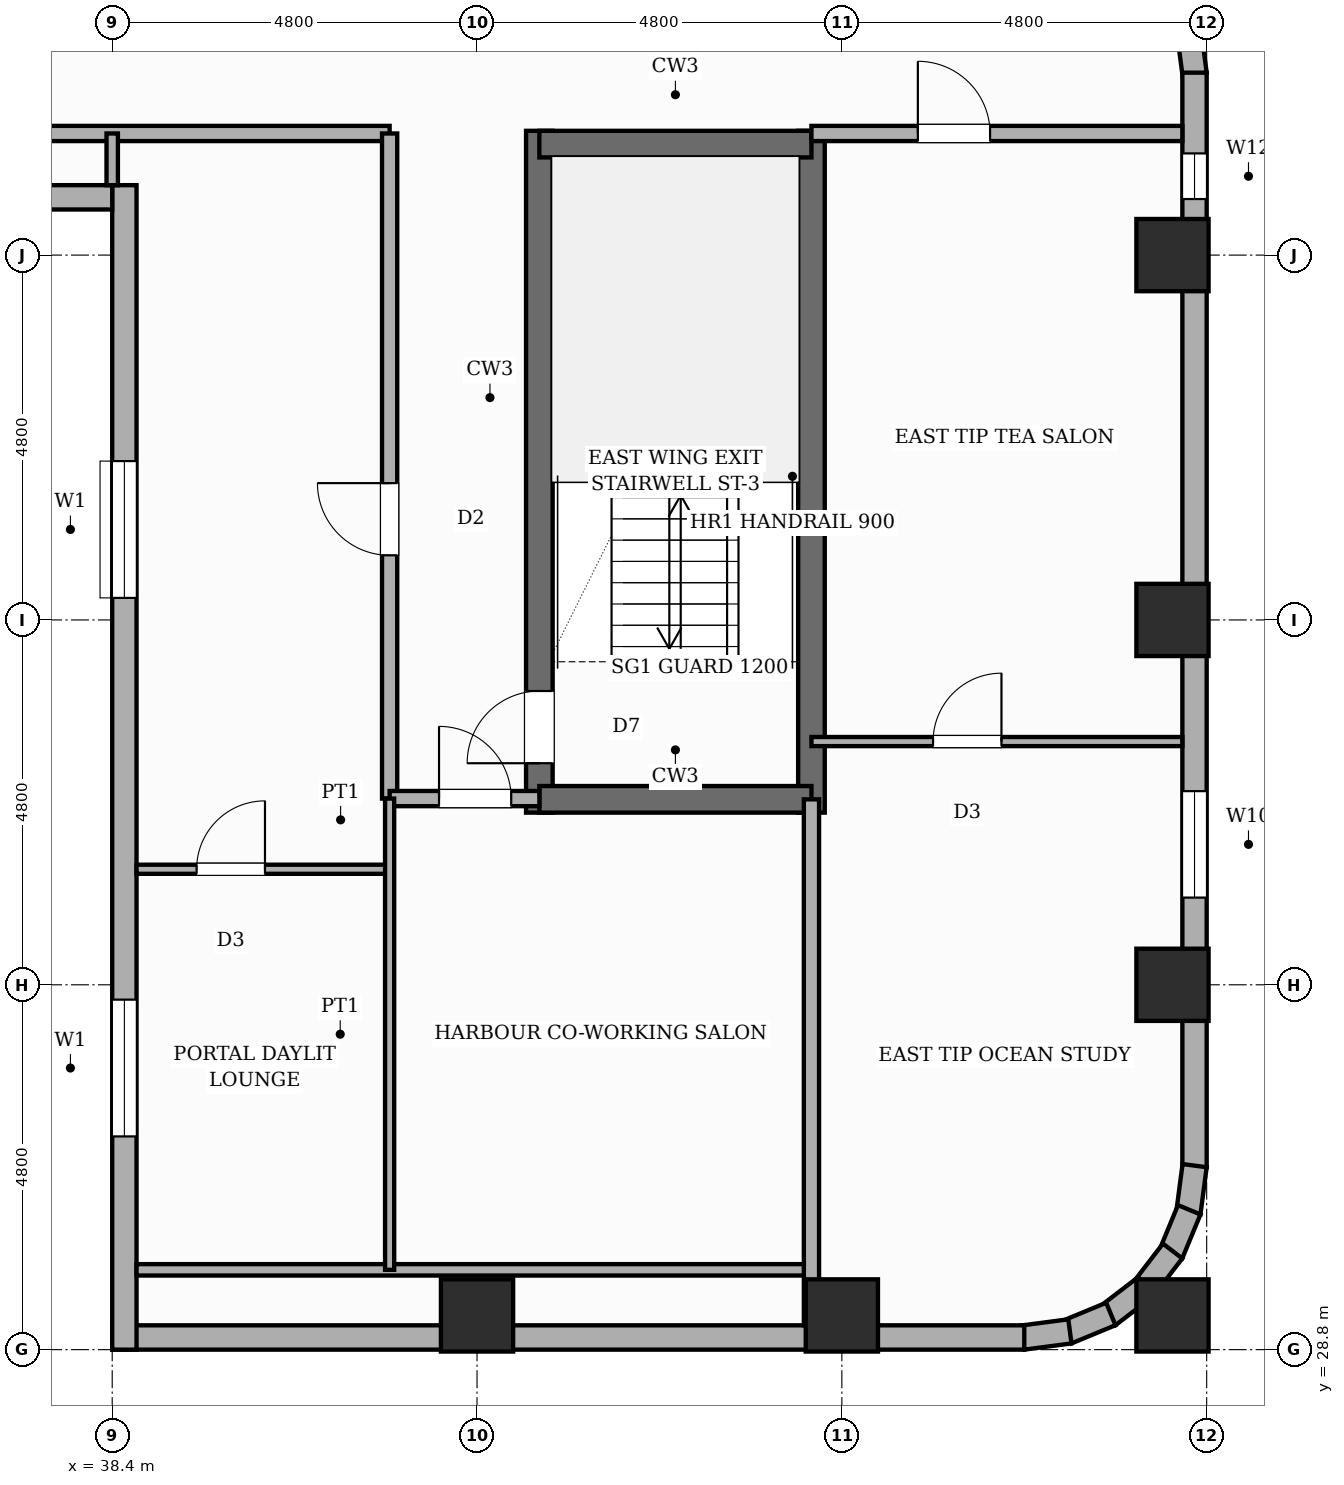
"""IFC4 building model, lengths in metres.
Left out: names, types, materials, properties, quantities, classifications, styles, units other than length and angle.
Written with IfcOpenShell. Run it as: python <this file> out.ifc"""

import sys

from ifc_helpers import new_model, si_unit, direction, frame, frame_2d, origin, origin_2d, place, context, subcontext, project, spatial, rectangle, extrude, element, fill, save


model = new_model("IFC4")
c1 = context("Model", 3, precision=1e-05, world=origin(), true_north=direction((0.0, 1.0)))
c2 = subcontext(c1, "Body", "Model", "MODEL_VIEW")
j1 = project(units=[si_unit("LENGTHUNIT", "METRE"), si_unit("PLANEANGLEUNIT", "RADIAN")], contexts=[c1])
p1 = place(None, origin())
s1 = spatial("IfcSite", under=j1, at=p1, CompositionType="ELEMENT")
p2 = place(p1, origin())
s2 = spatial("IfcBuilding", under=s1, at=p2, CompositionType="ELEMENT")
p3 = place(p2, frame((0.0, 0.0, 107.2)))
s3 = spatial("IfcBuildingStorey", under=s2, at=p3, CompositionType="ELEMENT", Elevation=107.2)
p4 = place(p3, frame((44.02, 35.865, 0.0), z_axis=(0.0, 0.0, 1.0), x_axis=(0.0, 1.0, 0.0)))
e1 = element("IfcWall", 1, at=p4, inside=s3, PredefinedType="SHEAR", context=c2, shape_type="SweptSolid", body=[
    extrude(rectangle(XDim=8.97, YDim=0.35, at=frame_2d((4.485, 0.0))), origin(), (0.0, 0.0, 1.0), 3.6),
])
p5 = place(p4, frame((0.65, 0.0, 0.0)))
e2 = element("IfcOpeningElement", 2, at=p5, cuts=e1, PredefinedType="OPENING", context=c2, shape_type="SweptSolid", body=[
    extrude(rectangle(XDim=0.95, YDim=2.1, at=frame_2d((0.475, 1.05))), frame((0.0, 0.185, 0.0), z_axis=(0.0, -1.0, 0.0), x_axis=(1.0, 0.0, 0.0)), (0.0, 0.0, 1.0), 0.37),
])
p6 = place(p3, frame((47.6, 35.865, 0.0), z_axis=(0.0, 0.0, 1.0), x_axis=(0.0, 1.0, 0.0)))
e3 = element("IfcWall", 3, at=p6, inside=s3, PredefinedType="SHEAR", context=c2, shape_type="SweptSolid", body=[
    extrude(rectangle(XDim=8.97, YDim=0.35, at=frame_2d((4.485, 0.0))), origin(), (0.0, 0.0, 1.0), 3.6),
])
for number, where, z_axis, x_axis in (
    (4, (44.02, 36.04, 0.0), (0.0, 0.0, 1.0), (1.0, 0.0, 0.0)),
    (5, (44.02, 44.66, 0.0), (0.0, 0.0, 1.0), (1.0, 0.0, 0.0)),
):
    element("IfcWall", number, at=place(p3, frame(where, z_axis=z_axis, x_axis=x_axis)), inside=s3, PredefinedType="SHEAR", context=c2, shape_type="SweptSolid", body=[
        extrude(rectangle(XDim=3.58, YDim=0.35, at=frame_2d((1.79, 0.0))), origin(), (0.0, 0.0, 1.0), 3.6),
    ])
for number, where, z_axis, x_axis in (
    (6, (43.2, 29.25, 0.0), (0.0, 0.0, 1.0), (1.0, 0.0, 0.0)),
    (7, (48.0, 29.25, 0.0), (0.0, 0.0, 1.0), (1.0, 0.0, 0.0)),
    (8, (52.35, 29.25, 0.0), (0.0, 0.0, 1.0), (1.0, 0.0, 0.0)),
    (9, (52.35, 33.6, 0.0), (0.0, 0.0, 1.0), (1.0, 0.0, 0.0)),
    (10, (52.35, 38.4, 0.0), (0.0, 0.0, 1.0), (1.0, 0.0, 0.0)),
    (11, (52.35, 43.2, 0.0), (0.0, 0.0, 1.0), (1.0, 0.0, 0.0)),
):
    element("IfcColumn", number, at=place(p3, frame(where, z_axis=z_axis, x_axis=x_axis)), inside=s3, PredefinedType="COLUMN", context=c2, shape_type="SweptSolid", body=[
        extrude(rectangle(XDim=0.95, YDim=0.95, at=origin_2d()), origin(), (0.0, 0.0, 1.0), 3.6),
    ])
p7 = place(p3, frame((52.56, 46.2, 0.0), z_axis=(0.0, 0.0, 1.0), x_axis=(0.130555323746, -0.9914410257, 0.0)))
e12 = element("IfcWall", 12, at=p7, inside=s3, PredefinedType="STANDARD", context=c2, shape_type="SweptSolid", body=[
    extrude(rectangle(XDim=0.626, YDim=0.32, at=frame_2d((0.313, 0.0))), origin(), (0.0, 0.0, 1.0), 2.54),
])
p8 = place(p3, frame((52.64, 45.6, 0.0), z_axis=(0.0, 0.0, 1.0), x_axis=(0.0, -1.0, 0.0)))
e13 = element("IfcWall", 13, at=p8, inside=s3, PredefinedType="STANDARD", context=c2, shape_type="SweptSolid", body=[
    extrude(rectangle(XDim=14.4, YDim=0.32, at=frame_2d((7.2, 0.0))), origin(), (0.0, 0.0, 1.0), 2.54),
])
p9 = place(p8, frame((1.062, 0.0, 0.45)))
e14 = element("IfcOpeningElement", 14, at=p9, cuts=e13, PredefinedType="OPENING", context=c2, shape_type="SweptSolid", body=[
    extrude(rectangle(XDim=0.6, YDim=1.8, at=frame_2d((0.3, 0.9))), frame((0.0, 0.17, 0.0), z_axis=(0.0, -1.0, 0.0), x_axis=(1.0, 0.0, 0.0)), (0.0, 0.0, 1.0), 0.34),
])
p10 = place(p8, frame((9.452, 0.0, 0.65)))
e15 = element("IfcOpeningElement", 15, at=p10, cuts=e13, PredefinedType="OPENING", context=c2, shape_type="SweptSolid", body=[
    extrude(rectangle(XDim=1.4, YDim=1.1, at=frame_2d((0.7, 0.55))), frame((0.0, 0.17, 0.0), z_axis=(0.0, -1.0, 0.0), x_axis=(1.0, 0.0, 0.0)), (0.0, 0.0, 1.0), 0.34),
])
p11 = place(p3, frame((52.641, 31.221, 0.0), z_axis=(0.0, 0.0, 1.0), x_axis=(-0.130504898859, -0.991447664465, 0.0)))
e16 = element("IfcWall", 16, at=p11, inside=s3, PredefinedType="STANDARD", context=c2, shape_type="SweptSolid", body=[
    extrude(rectangle(XDim=0.627, YDim=0.32, at=frame_2d((0.313, 0.0))), origin(), (0.0, 0.0, 1.0), 2.54),
])
p12 = place(p3, frame((52.57, 30.64, 0.0), z_axis=(0.0, 0.0, 1.0), x_axis=(-0.382455093999, -0.923974080304, 0.0)))
e17 = element("IfcWall", 17, at=p12, inside=s3, PredefinedType="STANDARD", context=c2, shape_type="SweptSolid", body=[
    extrude(rectangle(XDim=0.626, YDim=0.32, at=frame_2d((0.313, 0.0))), origin(), (0.0, 0.0, 1.0), 2.54),
])
p13 = place(p3, frame((52.352, 30.097, 0.0), z_axis=(0.0, 0.0, 1.0), x_axis=(-0.608693302629, -0.793405610854, 0.0)))
e18 = element("IfcWall", 18, at=p13, inside=s3, PredefinedType="STANDARD", context=c2, shape_type="SweptSolid", body=[
    extrude(rectangle(XDim=0.626, YDim=0.32, at=frame_2d((0.313, 0.0))), origin(), (0.0, 0.0, 1.0), 2.54),
])
p14 = place(p3, frame((52.0, 29.63, 0.0), z_axis=(0.0, 0.0, 1.0), x_axis=(-0.7932174212, -0.608938521285, 0.0)))
e19 = element("IfcWall", 19, at=p14, inside=s3, PredefinedType="STANDARD", context=c2, shape_type="SweptSolid", body=[
    extrude(rectangle(XDim=0.627, YDim=0.32, at=frame_2d((0.313, 0.0))), origin(), (0.0, 0.0, 1.0), 2.54),
])
for number, where, z_axis, x_axis in (
    (20, (51.539, 29.269, 0.0), (0.0, 0.0, 1.0), (-0.924, -0.383, 0.0)),
    (21, (51.0, 29.04, 0.0), (0.0, 0.0, 1.0), (-0.991, -0.131, 0.0)),
):
    element("IfcWall", number, at=place(p3, frame(where, z_axis=z_axis, x_axis=x_axis)), inside=s3, PredefinedType="STANDARD", context=c2, shape_type="SweptSolid", body=[
        extrude(rectangle(XDim=0.626, YDim=0.32, at=frame_2d((0.313, 0.0))), origin(), (0.0, 0.0, 1.0), 2.54),
    ])
p15 = place(p3, frame((50.4, 28.96, 0.0), z_axis=(0.0, 0.0, 1.0), x_axis=(-1.0, 0.0, 0.0)))
e22 = element("IfcWall", 22, at=p15, inside=s3, PredefinedType="STANDARD", context=c2, shape_type="SweptSolid", body=[
    extrude(rectangle(XDim=12.0, YDim=0.32, at=frame_2d((6.0, 0.0))), origin(), (0.0, 0.0, 1.0), 1.78),
])
p16 = place(p3, frame((38.56, 28.8, 0.0), z_axis=(0.0, 0.0, 1.0), x_axis=(0.0, 1.0, 0.0)))
e23 = element("IfcWall", 23, at=p16, inside=s3, PredefinedType="STANDARD", context=c2, shape_type="SweptSolid", body=[
    extrude(rectangle(XDim=15.32, YDim=0.32, at=frame_2d((7.66, 0.0))), origin(), (0.0, 0.0, 1.0), 3.36),
])
p17 = place(p16, frame((9.89, 0.0, 0.8)))
e24 = element("IfcOpeningElement", 24, at=p17, cuts=e23, PredefinedType="OPENING", context=c2, shape_type="SweptSolid", body=[
    extrude(rectangle(XDim=1.8, YDim=2.1, at=frame_2d((0.9, 1.05))), frame((0.0, 0.17, 0.0), z_axis=(0.0, -1.0, 0.0), x_axis=(1.0, 0.0, 0.0)), (0.0, 0.0, 1.0), 0.34),
])
p18 = place(p16, frame((2.805, 0.0, 0.8)))
e25 = element("IfcOpeningElement", 25, at=p18, cuts=e23, PredefinedType="OPENING", context=c2, shape_type="SweptSolid", body=[
    extrude(rectangle(XDim=1.8, YDim=2.1, at=frame_2d((0.9, 1.05))), frame((0.0, 0.17, 0.0), z_axis=(0.0, -1.0, 0.0), x_axis=(1.0, 0.0, 0.0)), (0.0, 0.0, 1.0), 0.34),
])
p19 = place(p3, frame((38.4, 43.96, 0.0), z_axis=(0.0, 0.0, 1.0), x_axis=(-1.0, 0.0, 0.0)))
e26 = element("IfcWall", 26, at=p19, inside=s3, PredefinedType="STANDARD", context=c2, shape_type="SweptSolid", body=[
    extrude(rectangle(XDim=12.32, YDim=0.32, at=frame_2d((6.16, 0.0))), origin(), (0.0, 0.0, 1.0), 3.36),
])
p20 = place(p19, frame((5.26, 0.0, 0.8)))
e27 = element("IfcOpeningElement", 27, at=p20, cuts=e26, PredefinedType="OPENING", context=c2, shape_type="SweptSolid", body=[
    extrude(rectangle(XDim=1.8, YDim=2.1, at=frame_2d((0.9, 1.05))), frame((0.0, 0.17, 0.0), z_axis=(0.0, -1.0, 0.0), x_axis=(1.0, 0.0, 0.0)), (0.0, 0.0, 1.0), 0.34),
])
p21 = place(p3, frame((24.75, 44.8, 0.0), z_axis=(0.0, 0.0, 1.0), x_axis=(1.0, 0.0, 0.0)))
e28 = element("IfcWall", 28, at=p21, inside=s3, PredefinedType="PARTITIONING", context=c2, shape_type="SweptSolid", body=[
    extrude(rectangle(XDim=17.3, YDim=0.2, at=frame_2d((8.65, 0.0))), origin(), (0.0, 0.0, 1.0), 3.36),
])
p22 = place(p21, frame((6.2, 0.0, 0.0)))
e29 = element("IfcOpeningElement", 29, at=p22, cuts=e28, PredefinedType="OPENING", context=c2, shape_type="SweptSolid", body=[
    extrude(rectangle(XDim=0.95, YDim=2.15, at=frame_2d((0.475, 1.075))), frame((0.0, 0.11, 0.0), z_axis=(0.0, -1.0, 0.0), x_axis=(1.0, 0.0, 0.0)), (0.0, 0.0, 1.0), 0.22),
])
p23 = place(p3, frame((38.4, 44.12, 0.0), z_axis=(0.0, 0.0, 1.0), x_axis=(0.0, 1.0, 0.0)))
e30 = element("IfcWall", 30, at=p23, inside=s3, PredefinedType="PARTITIONING", context=c2, shape_type="SweptSolid", body=[
    extrude(rectangle(XDim=0.68, YDim=0.15, at=frame_2d((0.34, 0.0))), origin(), (0.0, 0.0, 1.0), 3.36),
])
p24 = place(p3, frame((47.6, 44.8, 0.0), z_axis=(0.0, 0.0, 1.0), x_axis=(1.0, 0.0, 0.0)))
e31 = element("IfcWall", 31, at=p24, inside=s3, PredefinedType="PARTITIONING", context=c2, shape_type="SweptSolid", body=[
    extrude(rectangle(XDim=4.88, YDim=0.2, at=frame_2d((2.44, 0.0))), origin(), (0.0, 0.0, 1.0), 3.36),
])
p25 = place(p24, frame((1.4, 0.0, 0.0)))
e32 = element("IfcOpeningElement", 32, at=p25, cuts=e31, PredefinedType="OPENING", context=c2, shape_type="SweptSolid", body=[
    extrude(rectangle(XDim=0.95, YDim=2.15, at=frame_2d((0.475, 1.075))), frame((0.0, 0.11, 0.0), z_axis=(0.0, -1.0, 0.0), x_axis=(1.0, 0.0, 0.0)), (0.0, 0.0, 1.0), 0.22),
])
p26 = place(p3, frame((42.05, 36.05, 0.0), z_axis=(0.0, 0.0, 1.0), x_axis=(0.0, 1.0, 0.0)))
e33 = element("IfcWall", 33, at=p26, inside=s3, PredefinedType="PARTITIONING", context=c2, shape_type="SweptSolid", body=[
    extrude(rectangle(XDim=8.75, YDim=0.2, at=frame_2d((4.375, 0.0))), origin(), (0.0, 0.0, 1.0), 3.36),
])
p27 = place(p26, frame((3.2, 0.0, 0.0)))
e34 = element("IfcOpeningElement", 34, at=p27, cuts=e33, PredefinedType="OPENING", context=c2, shape_type="SweptSolid", body=[
    extrude(rectangle(XDim=0.95, YDim=2.15, at=frame_2d((0.475, 1.075))), frame((0.0, 0.11, 0.0), z_axis=(0.0, -1.0, 0.0), x_axis=(1.0, 0.0, 0.0)), (0.0, 0.0, 1.0), 0.22),
])
p28 = place(p3, frame((42.05, 36.05, 0.0), z_axis=(0.0, 0.0, 1.0), x_axis=(1.0, 0.0, 0.0)))
e35 = element("IfcWall", 35, at=p28, inside=s3, PredefinedType="PARTITIONING", context=c2, shape_type="SweptSolid", body=[
    extrude(rectangle(XDim=1.97, YDim=0.2, at=frame_2d((0.985, 0.0))), origin(), (0.0, 0.0, 1.0), 3.36),
])
p29 = place(p28, frame((0.65, 0.0, 0.0)))
e36 = element("IfcOpeningElement", 36, at=p29, cuts=e35, PredefinedType="OPENING", context=c2, shape_type="SweptSolid", body=[
    extrude(rectangle(XDim=0.95, YDim=2.15, at=frame_2d((0.475, 1.075))), frame((0.0, 0.11, 0.0), z_axis=(0.0, -1.0, 0.0), x_axis=(1.0, 0.0, 0.0)), (0.0, 0.0, 1.0), 0.22),
])
p30 = place(p3, frame((38.72, 29.85, 0.0), z_axis=(0.0, 0.0, 1.0), x_axis=(1.0, 0.0, 0.0)))
e37 = element("IfcWall", 37, at=p30, inside=s3, PredefinedType="PARTITIONING", context=c2, shape_type="SweptSolid", body=[
    extrude(rectangle(XDim=8.88, YDim=0.15, at=frame_2d((4.44, 0.0))), origin(), (0.0, 0.0, 1.0), 1.78),
])
p31 = place(p3, frame((38.72, 35.12, 0.0), z_axis=(0.0, 0.0, 1.0), x_axis=(1.0, 0.0, 0.0)))
e38 = element("IfcWall", 38, at=p31, inside=s3, PredefinedType="PARTITIONING", context=c2, shape_type="SweptSolid", body=[
    extrude(rectangle(XDim=3.33, YDim=0.12, at=frame_2d((1.665, 0.0))), origin(), (0.0, 0.0, 1.0), 3.36),
])
p32 = place(p31, frame((0.79, 0.0, 0.0)))
e39 = element("IfcOpeningElement", 39, at=p32, cuts=e38, PredefinedType="OPENING", context=c2, shape_type="SweptSolid", body=[
    extrude(rectangle(XDim=0.9, YDim=2.15, at=frame_2d((0.45, 1.075))), frame((0.0, 0.07, 0.0), z_axis=(0.0, -1.0, 0.0), x_axis=(1.0, 0.0, 0.0)), (0.0, 0.0, 1.0), 0.14),
])
p33 = place(p3, frame((42.05, 29.85, 0.0), z_axis=(0.0, 0.0, 1.0), x_axis=(0.0, 1.0, 0.0)))
e40 = element("IfcWall", 40, at=p33, inside=s3, PredefinedType="PARTITIONING", context=c2, shape_type="SweptSolid", body=[
    extrude(rectangle(XDim=6.2, YDim=0.12, at=frame_2d((3.1, 0.0))), origin(), (0.0, 0.0, 1.0), 3.36),
])
p34 = place(p3, frame((47.6, 29.12, 0.0), z_axis=(0.0, 0.0, 1.0), x_axis=(0.0, 1.0, 0.0)))
e41 = element("IfcWall", 41, at=p34, inside=s3, PredefinedType="SOLIDWALL", context=c2, shape_type="SweptSolid", body=[
    extrude(rectangle(XDim=6.92, YDim=0.2, at=frame_2d((3.46, 0.0))), origin(), (0.0, 0.0, 1.0), 3.36),
])
p35 = place(p3, frame((47.6, 36.8, 0.0), z_axis=(0.0, 0.0, 1.0), x_axis=(1.0, 0.0, 0.0)))
e42 = element("IfcWall", 42, at=p35, inside=s3, PredefinedType="PARTITIONING", context=c2, shape_type="SweptSolid", body=[
    extrude(rectangle(XDim=4.88, YDim=0.12, at=frame_2d((2.44, 0.0))), origin(), (0.0, 0.0, 1.0), 3.36),
])
p36 = place(p35, frame((1.6, 0.0, 0.0)))
e43 = element("IfcOpeningElement", 43, at=p36, cuts=e42, PredefinedType="OPENING", context=c2, shape_type="SweptSolid", body=[
    extrude(rectangle(XDim=0.9, YDim=2.15, at=frame_2d((0.45, 1.075))), frame((0.0, 0.07, 0.0), z_axis=(0.0, -1.0, 0.0), x_axis=(1.0, 0.0, 0.0)), (0.0, 0.0, 1.0), 0.14),
])
p37 = place(p9, origin())
e44 = element("IfcWindow", 44, at=p37, inside=s3, PartitioningType="SINGLE_PANEL", PredefinedType="WINDOW", context=c2, shape_type="SweptSolid", body=[
    extrude(rectangle(XDim=0.6, YDim=1.8, at=frame_2d((0.3, 0.9))), frame((0.0, 0.03, 0.0), z_axis=(0.0, -1.0, 0.0), x_axis=(1.0, 0.0, 0.0)), (0.0, 0.0, 1.0), 0.06),
])
fill(e14, e44)
p38 = place(p10, origin())
e45 = element("IfcWindow", 45, at=p38, inside=s3, PartitioningType="SINGLE_PANEL", PredefinedType="WINDOW", context=c2, shape_type="SweptSolid", body=[
    extrude(rectangle(XDim=1.4, YDim=1.1, at=frame_2d((0.7, 0.55))), frame((0.0, 0.03, 0.0), z_axis=(0.0, -1.0, 0.0), x_axis=(1.0, 0.0, 0.0)), (0.0, 0.0, 1.0), 0.06),
])
fill(e15, e45)
p39 = place(p17, origin())
e46 = element("IfcWindow", 46, at=p39, inside=s3, PartitioningType="SINGLE_PANEL", PredefinedType="WINDOW", context=c2, shape_type="SweptSolid", body=[
    extrude(rectangle(XDim=1.8, YDim=2.1, at=frame_2d((0.9, 1.05))), frame((0.0, 0.03, 0.0), z_axis=(0.0, -1.0, 0.0), x_axis=(1.0, 0.0, 0.0)), (0.0, 0.0, 1.0), 0.06),
])
fill(e24, e46)
p40 = place(p18, origin())
e47 = element("IfcWindow", 47, at=p40, inside=s3, PartitioningType="SINGLE_PANEL", PredefinedType="WINDOW", context=c2, shape_type="SweptSolid", body=[
    extrude(rectangle(XDim=1.8, YDim=2.1, at=frame_2d((0.9, 1.05))), frame((0.0, 0.03, 0.0), z_axis=(0.0, -1.0, 0.0), x_axis=(1.0, 0.0, 0.0)), (0.0, 0.0, 1.0), 0.06),
])
fill(e25, e47)
p41 = place(p5, origin())
e48 = element("IfcDoor", 48, at=p41, inside=s3, OperationType="SINGLE_SWING_LEFT", PredefinedType="DOOR", context=c2, shape_type="SweptSolid", body=[
    extrude(rectangle(XDim=0.95, YDim=2.1, at=frame_2d((0.475, 1.05))), frame((0.0, 0.025, 0.0), z_axis=(0.0, -1.0, 0.0), x_axis=(1.0, 0.0, 0.0)), (0.0, 0.0, 1.0), 0.05),
])
fill(e2, e48)
p42 = place(p27, origin())
e49 = element("IfcDoor", 49, at=p42, inside=s3, OperationType="SINGLE_SWING_RIGHT", PredefinedType="DOOR", context=c2, shape_type="SweptSolid", body=[
    extrude(rectangle(XDim=0.95, YDim=2.15, at=frame_2d((0.475, 1.075))), frame((0.0, 0.025, 0.0), z_axis=(0.0, -1.0, 0.0), x_axis=(1.0, 0.0, 0.0)), (0.0, 0.0, 1.0), 0.05),
])
fill(e34, e49)
p43 = place(p32, origin())
e50 = element("IfcDoor", 50, at=p43, inside=s3, OperationType="SINGLE_SWING_RIGHT", PredefinedType="DOOR", context=c2, shape_type="SweptSolid", body=[
    extrude(rectangle(XDim=0.9, YDim=2.15, at=frame_2d((0.45, 1.075))), frame((0.0, 0.025, 0.0), z_axis=(0.0, -1.0, 0.0), x_axis=(1.0, 0.0, 0.0)), (0.0, 0.0, 1.0), 0.05),
])
fill(e39, e50)
p44 = place(p29, origin())
e51 = element("IfcDoor", 51, at=p44, inside=s3, OperationType="SINGLE_SWING_LEFT", PredefinedType="DOOR", context=c2, shape_type="SweptSolid", body=[
    extrude(rectangle(XDim=0.95, YDim=2.15, at=frame_2d((0.475, 1.075))), frame((0.0, 0.025, 0.0), z_axis=(0.0, -1.0, 0.0), x_axis=(1.0, 0.0, 0.0)), (0.0, 0.0, 1.0), 0.05),
])
fill(e36, e51)
p45 = place(p25, origin())
e52 = element("IfcDoor", 52, at=p45, inside=s3, OperationType="SINGLE_SWING_LEFT", PredefinedType="DOOR", context=c2, shape_type="SweptSolid", body=[
    extrude(rectangle(XDim=0.95, YDim=2.15, at=frame_2d((0.475, 1.075))), frame((0.0, 0.025, 0.0), z_axis=(0.0, -1.0, 0.0), x_axis=(1.0, 0.0, 0.0)), (0.0, 0.0, 1.0), 0.05),
])
fill(e32, e52)
p46 = place(p36, origin())
e53 = element("IfcDoor", 53, at=p46, inside=s3, OperationType="SINGLE_SWING_RIGHT", PredefinedType="DOOR", context=c2, shape_type="SweptSolid", body=[
    extrude(rectangle(XDim=0.9, YDim=2.15, at=frame_2d((0.45, 1.075))), frame((0.0, 0.025, 0.0), z_axis=(0.0, -1.0, 0.0), x_axis=(1.0, 0.0, 0.0)), (0.0, 0.0, 1.0), 0.05),
])
fill(e43, e53)
save(model, sys.argv[1])
